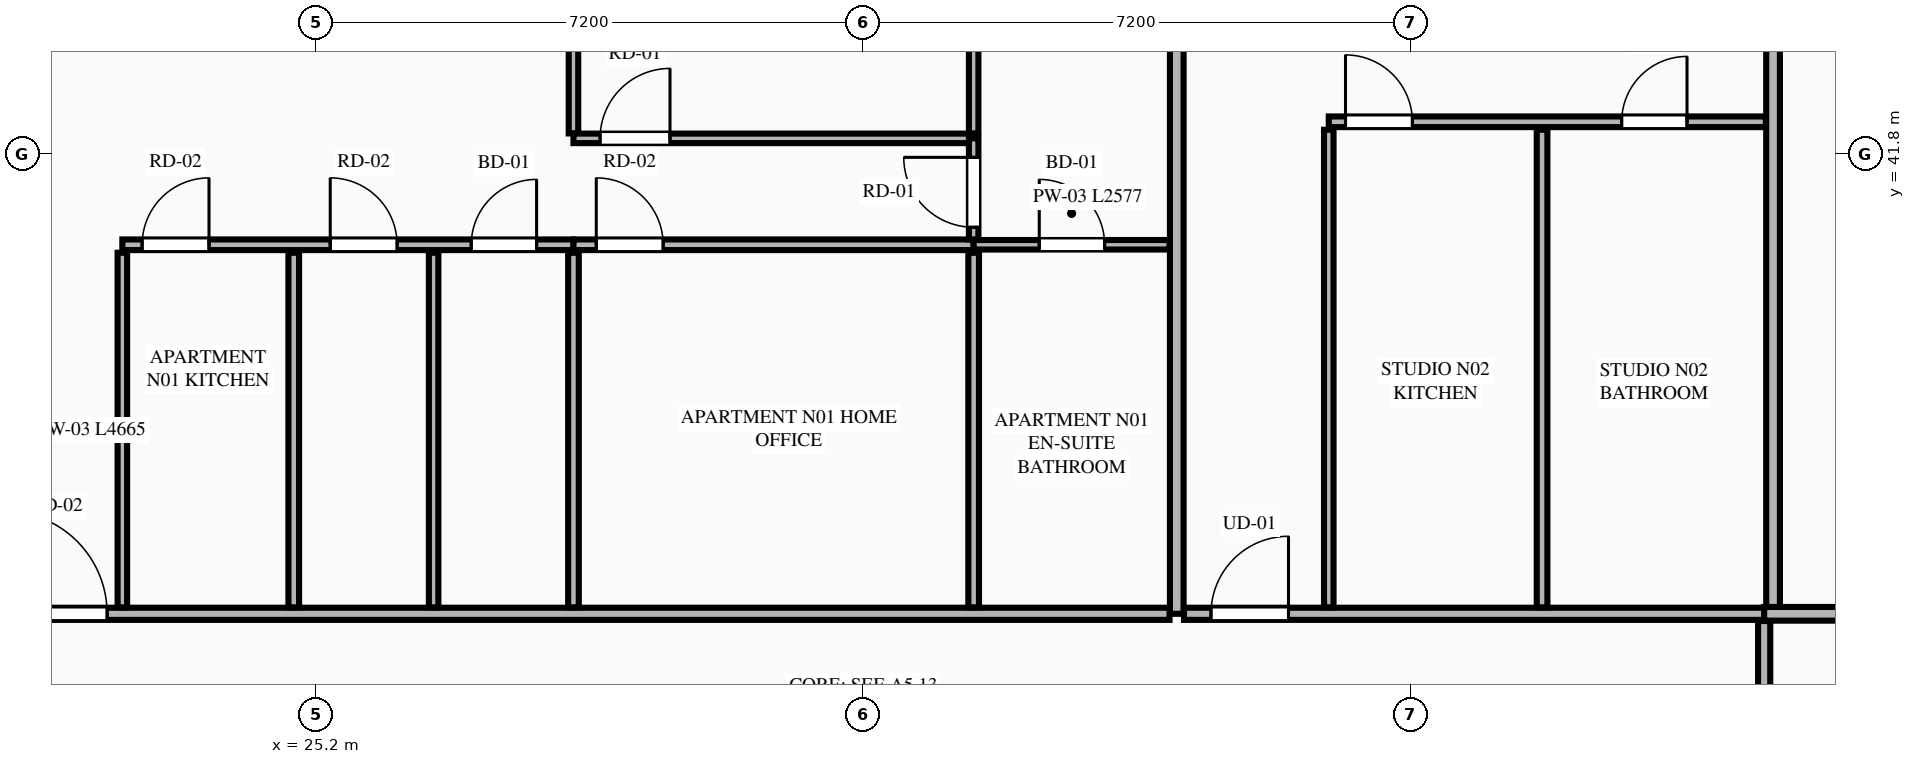
"""IFC4 building model, lengths in metres.
Left out: names, types, materials, properties, quantities, classifications, styles, units other than length and angle.
Written with IfcOpenShell. Run it as: python <this file> out.ifc"""

import sys

from ifc_helpers import new_model, si_unit, direction, frame, frame_2d, origin, place, context, subcontext, project, spatial, rectangle, extrude, element, fill, save


model = new_model("IFC4")
c1 = context("Model", 3, precision=1e-05, world=origin(), true_north=direction((0.0, 1.0)))
c2 = subcontext(c1, "Body", "Model", "MODEL_VIEW")
j1 = project(units=[si_unit("LENGTHUNIT", "METRE"), si_unit("PLANEANGLEUNIT", "RADIAN")], contexts=[c1])
p1 = place(None, origin())
s1 = spatial("IfcSite", under=j1, at=p1, CompositionType="ELEMENT")
p2 = place(p1, origin())
s2 = spatial("IfcBuilding", under=s1, at=p2, CompositionType="ELEMENT")
p3 = place(p2, frame((0.0, 0.0, 94.2)))
s3 = spatial("IfcBuildingStorey", under=s2, at=p3, CompositionType="ELEMENT", Elevation=94.2)
for number, where, z_axis, x_axis in (
    (1, (36.522, 35.75, 0.0), (0.0, 0.0, 1.0), (0.0, 1.0, 0.0)),
    (2, (44.367, 35.75, 0.0), (0.0, 0.0, 1.0), (0.0, 1.0, 0.0)),
):
    element("IfcWall", number, at=place(p3, frame(where, z_axis=z_axis, x_axis=x_axis)), inside=s3, PredefinedType="PARTITIONING", context=c2, shape_type="SweptSolid", body=[
        extrude(rectangle(XDim=13.485, YDim=0.18, at=frame_2d((6.743, 0.0))), origin(), (0.0, 0.0, 1.0), 2.59),
    ])
p4 = place(p3, frame((20.528, 35.75, 0.0), z_axis=(0.0, 0.0, 1.0), x_axis=(1.0, 0.0, 0.0)))
e3 = element("IfcWall", 3, at=p4, inside=s3, PredefinedType="PARTITIONING", context=c2, shape_type="SweptSolid", body=[
    extrude(rectangle(XDim=15.899, YDim=0.16, at=frame_2d((7.949, 0.0))), origin(), (0.0, 0.0, 1.0), 3.99),
])
p5 = place(p4, frame((0.572, 0.0, 0.0)))
e4 = element("IfcOpeningElement", 4, at=p5, cuts=e3, PredefinedType="OPENING", context=c2, shape_type="SweptSolid", body=[
    extrude(rectangle(XDim=1.35, YDim=2.35, at=frame_2d((0.675, 1.175))), frame((0.0, 0.09, 0.0), z_axis=(0.0, -1.0, 0.0), x_axis=(1.0, 0.0, 0.0)), (0.0, 0.0, 1.0), 0.18),
])
p6 = place(p3, frame((22.65, 35.835, 0.0), z_axis=(0.0, 0.0, 1.0), x_axis=(0.0, 1.0, 0.0)))
e5 = element("IfcWall", 5, at=p6, inside=s3, PredefinedType="PARTITIONING", context=c2, shape_type="SweptSolid", body=[
    extrude(rectangle(XDim=4.665, YDim=0.125, at=frame_2d((2.333, 0.0))), origin(), (0.0, 0.0, 1.0), 2.59),
])
p7 = place(p3, frame((22.65, 40.605, 0.0), z_axis=(0.0, 0.0, 1.0), x_axis=(1.0, 0.0, 0.0)))
e6 = element("IfcWall", 6, at=p7, inside=s3, PredefinedType="PLUMBINGWALL", context=c2, shape_type="SweptSolid", body=[
    extrude(rectangle(XDim=5.935, YDim=0.14, at=frame_2d((2.968, 0.0))), origin(), (0.0, 0.0, 1.0), 3.99),
])
p8 = place(p7, frame((4.59, 0.0, 0.0)))
e7 = element("IfcOpeningElement", 7, at=p8, cuts=e6, PredefinedType="OPENING", context=c2, shape_type="SweptSolid", body=[
    extrude(rectangle(XDim=0.86, YDim=2.1, at=frame_2d((0.43, 1.05))), frame((0.0, 0.08, 0.0), z_axis=(0.0, -1.0, 0.0), x_axis=(1.0, 0.0, 0.0)), (0.0, 0.0, 1.0), 0.16),
])
p9 = place(p7, frame((0.26, 0.0, 0.0)))
e8 = element("IfcOpeningElement", 8, at=p9, cuts=e6, PredefinedType="OPENING", context=c2, shape_type="SweptSolid", body=[
    extrude(rectangle(XDim=0.88, YDim=2.15, at=frame_2d((0.44, 1.075))), frame((0.0, 0.08, 0.0), z_axis=(0.0, -1.0, 0.0), x_axis=(1.0, 0.0, 0.0)), (0.0, 0.0, 1.0), 0.16),
])
p10 = place(p7, frame((2.735, 0.0, 0.0)))
e9 = element("IfcOpeningElement", 9, at=p10, cuts=e6, PredefinedType="OPENING", context=c2, shape_type="SweptSolid", body=[
    extrude(rectangle(XDim=0.88, YDim=2.15, at=frame_2d((0.44, 1.075))), frame((0.0, 0.08, 0.0), z_axis=(0.0, -1.0, 0.0), x_axis=(1.0, 0.0, 0.0)), (0.0, 0.0, 1.0), 0.16),
])
p11 = place(p3, frame((28.585, 40.605, 0.0), z_axis=(0.0, 0.0, 1.0), x_axis=(1.0, 0.0, 0.0)))
e10 = element("IfcWall", 10, at=p11, inside=s3, PredefinedType="PLUMBINGWALL", context=c2, shape_type="SweptSolid", body=[
    extrude(rectangle(XDim=5.265, YDim=0.14, at=frame_2d((2.633, 0.0))), origin(), (0.0, 0.0, 1.0), 3.99),
])
p12 = place(p11, frame((0.3, 0.0, 0.0)))
e11 = element("IfcOpeningElement", 11, at=p12, cuts=e10, PredefinedType="OPENING", context=c2, shape_type="SweptSolid", body=[
    extrude(rectangle(XDim=0.88, YDim=2.15, at=frame_2d((0.44, 1.075))), frame((0.0, 0.08, 0.0), z_axis=(0.0, -1.0, 0.0), x_axis=(1.0, 0.0, 0.0)), (0.0, 0.0, 1.0), 0.16),
])
p13 = place(p3, frame((33.85, 40.605, 0.0), z_axis=(0.0, 0.0, 1.0), x_axis=(1.0, 0.0, 0.0)))
e12 = element("IfcWall", 12, at=p13, inside=s3, PredefinedType="PARTITIONING", context=c2, shape_type="SweptSolid", body=[
    extrude(rectangle(XDim=2.577, YDim=0.125, at=frame_2d((1.289, 0.0))), origin(), (0.0, 0.0, 1.0), 3.99),
])
p14 = place(p13, frame((0.863, 0.0, 0.0)))
e13 = element("IfcOpeningElement", 13, at=p14, cuts=e12, PredefinedType="OPENING", context=c2, shape_type="SweptSolid", body=[
    extrude(rectangle(XDim=0.86, YDim=2.1, at=frame_2d((0.43, 1.05))), frame((0.0, 0.073, 0.0), z_axis=(0.0, -1.0, 0.0), x_axis=(1.0, 0.0, 0.0)), (0.0, 0.0, 1.0), 0.145),
])
p15 = place(p3, frame((24.905, 35.835, 0.0), z_axis=(0.0, 0.0, 1.0), x_axis=(0.0, 1.0, 0.0)))
e14 = element("IfcWall", 14, at=p15, inside=s3, PredefinedType="PLUMBINGWALL", context=c2, shape_type="SweptSolid", body=[
    extrude(rectangle(XDim=4.665, YDim=0.14, at=frame_2d((2.333, 0.0))), origin(), (0.0, 0.0, 1.0), 3.99),
])
p16 = place(p3, frame((26.745, 35.835, 0.0), z_axis=(0.0, 0.0, 1.0), x_axis=(0.0, 1.0, 0.0)))
e15 = element("IfcWall", 15, at=p16, inside=s3, PredefinedType="PARTITIONING", context=c2, shape_type="SweptSolid", body=[
    extrude(rectangle(XDim=4.665, YDim=0.125, at=frame_2d((2.333, 0.0))), origin(), (0.0, 0.0, 1.0), 3.99),
])
p17 = place(p3, frame((28.585, 42.07, 0.0), z_axis=(0.0, 0.0, 1.0), x_axis=(0.0, 1.0, 0.0)))
e16 = element("IfcWall", 16, at=p17, inside=s3, PredefinedType="PARTITIONING", context=c2, shape_type="SweptSolid", body=[
    extrude(rectangle(XDim=7.165, YDim=0.125, at=frame_2d((3.583, 0.0))), origin(), (0.0, 0.0, 1.0), 2.59),
])
p18 = place(p3, frame((28.585, 42.005, 0.0), z_axis=(0.0, 0.0, 1.0), x_axis=(1.0, 0.0, 0.0)))
e17 = element("IfcWall", 17, at=p18, inside=s3, PredefinedType="PARTITIONING", context=c2, shape_type="SweptSolid", body=[
    extrude(rectangle(XDim=5.265, YDim=0.125, at=frame_2d((2.633, 0.0))), origin(), (0.0, 0.0, 1.0), 3.99),
])
p19 = place(p18, frame((0.35, 0.0, 0.0)))
e18 = element("IfcOpeningElement", 18, at=p19, cuts=e17, PredefinedType="OPENING", context=c2, shape_type="SweptSolid", body=[
    extrude(rectangle(XDim=0.92, YDim=2.15, at=frame_2d((0.46, 1.075))), frame((0.0, 0.073, 0.0), z_axis=(0.0, -1.0, 0.0), x_axis=(1.0, 0.0, 0.0)), (0.0, 0.0, 1.0), 0.145),
])
p20 = place(p3, frame((33.85, 40.675, 0.0), z_axis=(0.0, 0.0, 1.0), x_axis=(0.0, 1.0, 0.0)))
e19 = element("IfcWall", 19, at=p20, inside=s3, PredefinedType="PARTITIONING", context=c2, shape_type="SweptSolid", body=[
    extrude(rectangle(XDim=1.33, YDim=0.125, at=frame_2d((0.665, 0.0))), origin(), (0.0, 0.0, 1.0), 3.99),
])
p21 = place(p20, frame((0.16, 0.0, 0.0)))
e20 = element("IfcOpeningElement", 20, at=p21, cuts=e19, PredefinedType="OPENING", context=c2, shape_type="SweptSolid", body=[
    extrude(rectangle(XDim=0.92, YDim=2.15, at=frame_2d((0.46, 1.075))), frame((0.0, 0.073, 0.0), z_axis=(0.0, -1.0, 0.0), x_axis=(1.0, 0.0, 0.0)), (0.0, 0.0, 1.0), 0.145),
])
p22 = place(p3, frame((28.585, 35.835, 0.0), z_axis=(0.0, 0.0, 1.0), x_axis=(0.0, 1.0, 0.0)))
e21 = element("IfcWall", 21, at=p22, inside=s3, PredefinedType="PLUMBINGWALL", context=c2, shape_type="SweptSolid", body=[
    extrude(rectangle(XDim=4.665, YDim=0.14, at=frame_2d((2.333, 0.0))), origin(), (0.0, 0.0, 1.0), 2.59),
])
p23 = place(p3, frame((33.85, 35.835, 0.0), z_axis=(0.0, 0.0, 1.0), x_axis=(0.0, 1.0, 0.0)))
e22 = element("IfcWall", 22, at=p23, inside=s3, PredefinedType="PLUMBINGWALL", context=c2, shape_type="SweptSolid", body=[
    extrude(rectangle(XDim=4.665, YDim=0.14, at=frame_2d((2.333, 0.0))), origin(), (0.0, 0.0, 1.0), 3.99),
])
p24 = place(p3, frame((33.85, 42.07, 0.0), z_axis=(0.0, 0.0, 1.0), x_axis=(0.0, 1.0, 0.0)))
e23 = element("IfcWall", 23, at=p24, inside=s3, PredefinedType="PARTITIONING", context=c2, shape_type="SweptSolid", body=[
    extrude(rectangle(XDim=7.165, YDim=0.125, at=frame_2d((3.583, 0.0))), origin(), (0.0, 0.0, 1.0), 3.99),
])
p25 = place(p3, frame((36.617, 35.75, 0.0), z_axis=(0.0, 0.0, 1.0), x_axis=(1.0, 0.0, 0.0)))
e24 = element("IfcWall", 24, at=p25, inside=s3, PredefinedType="PARTITIONING", context=c2, shape_type="SweptSolid", body=[
    extrude(rectangle(XDim=7.655, YDim=0.16, at=frame_2d((3.828, 0.0))), origin(), (0.0, 0.0, 1.0), 3.99),
])
p26 = place(p25, frame((0.355, 0.0, 0.0)))
e25 = element("IfcOpeningElement", 25, at=p26, cuts=e24, PredefinedType="OPENING", context=c2, shape_type="SweptSolid", body=[
    extrude(rectangle(XDim=1.02, YDim=2.25, at=frame_2d((0.51, 1.125))), frame((0.0, 0.09, 0.0), z_axis=(0.0, -1.0, 0.0), x_axis=(1.0, 0.0, 0.0)), (0.0, 0.0, 1.0), 0.18),
])
p27 = place(p3, frame((38.522, 35.835, 0.0), z_axis=(0.0, 0.0, 1.0), x_axis=(0.0, 1.0, 0.0)))
e26 = element("IfcWall", 26, at=p27, inside=s3, PredefinedType="PARTITIONING", context=c2, shape_type="SweptSolid", body=[
    extrude(rectangle(XDim=6.283, YDim=0.125, at=frame_2d((3.142, 0.0))), origin(), (0.0, 0.0, 1.0), 3.99),
])
p28 = place(p3, frame((38.522, 42.223, 0.0), z_axis=(0.0, 0.0, 1.0), x_axis=(1.0, 0.0, 0.0)))
e27 = element("IfcWall", 27, at=p28, inside=s3, PredefinedType="PLUMBINGWALL", context=c2, shape_type="SweptSolid", body=[
    extrude(rectangle(XDim=5.75, YDim=0.14, at=frame_2d((2.875, 0.0))), origin(), (0.0, 0.0, 1.0), 3.99),
])
p29 = place(p28, frame((3.853, 0.0, 0.0)))
e28 = element("IfcOpeningElement", 28, at=p29, cuts=e27, PredefinedType="OPENING", context=c2, shape_type="SweptSolid", body=[
    extrude(rectangle(XDim=0.86, YDim=2.1, at=frame_2d((0.43, 1.05))), frame((0.0, 0.08, 0.0), z_axis=(0.0, -1.0, 0.0), x_axis=(1.0, 0.0, 0.0)), (0.0, 0.0, 1.0), 0.16),
])
p30 = place(p28, frame((0.22, 0.0, 0.0)))
e29 = element("IfcOpeningElement", 29, at=p30, cuts=e27, PredefinedType="OPENING", context=c2, shape_type="SweptSolid", body=[
    extrude(rectangle(XDim=0.88, YDim=2.15, at=frame_2d((0.44, 1.075))), frame((0.0, 0.08, 0.0), z_axis=(0.0, -1.0, 0.0), x_axis=(1.0, 0.0, 0.0)), (0.0, 0.0, 1.0), 0.16),
])
p31 = place(p3, frame((41.328, 35.835, 0.0), z_axis=(0.0, 0.0, 1.0), x_axis=(0.0, 1.0, 0.0)))
e30 = element("IfcWall", 30, at=p31, inside=s3, PredefinedType="PLUMBINGWALL", context=c2, shape_type="SweptSolid", body=[
    extrude(rectangle(XDim=6.283, YDim=0.14, at=frame_2d((3.142, 0.0))), origin(), (0.0, 0.0, 1.0), 2.59),
])
p32 = place(p3, frame((44.25, 35.75, 0.0), z_axis=(0.0, 0.0, 1.0), x_axis=(1.0, 0.0, 0.0)))
e31 = element("IfcWall", 31, at=p32, inside=s3, PredefinedType="PARTITIONING", context=c2, shape_type="SweptSolid", body=[
    extrude(rectangle(XDim=9.947, YDim=0.18, at=frame_2d((4.974, 0.0))), origin(), (0.0, 0.0, 1.0), 3.99),
])
p33 = place(p3, frame((44.25, 16.295, 0.0), z_axis=(0.0, 0.0, 1.0), x_axis=(0.0, 1.0, 0.0)))
e32 = element("IfcWall", 32, at=p33, inside=s3, PredefinedType="PARTITIONING", context=c2, shape_type="SweptSolid", body=[
    extrude(rectangle(XDim=19.36, YDim=0.16, at=frame_2d((9.68, 0.0))), origin(), (0.0, 0.0, 1.0), 2.59),
])
p34 = place(p33, frame((0.45, 0.0, 0.0)))
e33 = element("IfcOpeningElement", 33, at=p34, cuts=e32, PredefinedType="OPENING", context=c2, shape_type="SweptSolid", body=[
    extrude(rectangle(XDim=1.02, YDim=2.25, at=frame_2d((0.51, 1.125))), frame((0.0, 0.09, 0.0), z_axis=(0.0, -1.0, 0.0), x_axis=(1.0, 0.0, 0.0)), (0.0, 0.0, 1.0), 0.18),
])
p35 = place(p8, origin())
e34 = element("IfcDoor", 34, at=p35, inside=s3, OperationType="SINGLE_SWING_RIGHT", PredefinedType="DOOR", context=c2, shape_type="SweptSolid", body=[
    extrude(rectangle(XDim=0.86, YDim=2.1, at=frame_2d((0.43, 1.05))), frame((0.0, 0.025, 0.0), z_axis=(0.0, -1.0, 0.0), x_axis=(1.0, 0.0, 0.0)), (0.0, 0.0, 1.0), 0.05),
])
fill(e7, e34)
p36 = place(p14, origin())
e35 = element("IfcDoor", 35, at=p36, inside=s3, OperationType="SINGLE_SWING_LEFT", PredefinedType="DOOR", context=c2, shape_type="SweptSolid", body=[
    extrude(rectangle(XDim=0.86, YDim=2.1, at=frame_2d((0.43, 1.05))), frame((0.0, 0.025, 0.0), z_axis=(0.0, -1.0, 0.0), x_axis=(1.0, 0.0, 0.0)), (0.0, 0.0, 1.0), 0.05),
])
fill(e13, e35)
p37 = place(p5, origin())
e36 = element("IfcDoor", 36, at=p37, inside=s3, OperationType="SINGLE_SWING_LEFT", PredefinedType="DOOR", context=c2, shape_type="SweptSolid", body=[
    extrude(rectangle(XDim=1.35, YDim=2.35, at=frame_2d((0.675, 1.175))), frame((0.0, 0.025, 0.0), z_axis=(0.0, -1.0, 0.0), x_axis=(1.0, 0.0, 0.0)), (0.0, 0.0, 1.0), 0.05),
])
fill(e4, e36)
p38 = place(p9, origin())
e37 = element("IfcDoor", 37, at=p38, inside=s3, OperationType="SINGLE_SWING_RIGHT", PredefinedType="DOOR", context=c2, shape_type="SweptSolid", body=[
    extrude(rectangle(XDim=0.88, YDim=2.15, at=frame_2d((0.44, 1.075))), frame((0.0, 0.025, 0.0), z_axis=(0.0, -1.0, 0.0), x_axis=(1.0, 0.0, 0.0)), (0.0, 0.0, 1.0), 0.05),
])
fill(e8, e37)
p39 = place(p10, origin())
e38 = element("IfcDoor", 38, at=p39, inside=s3, OperationType="SINGLE_SWING_LEFT", PredefinedType="DOOR", context=c2, shape_type="SweptSolid", body=[
    extrude(rectangle(XDim=0.88, YDim=2.15, at=frame_2d((0.44, 1.075))), frame((0.0, 0.025, 0.0), z_axis=(0.0, -1.0, 0.0), x_axis=(1.0, 0.0, 0.0)), (0.0, 0.0, 1.0), 0.05),
])
fill(e9, e38)
p40 = place(p12, origin())
e39 = element("IfcDoor", 39, at=p40, inside=s3, OperationType="SINGLE_SWING_LEFT", PredefinedType="DOOR", context=c2, shape_type="SweptSolid", body=[
    extrude(rectangle(XDim=0.88, YDim=2.15, at=frame_2d((0.44, 1.075))), frame((0.0, 0.025, 0.0), z_axis=(0.0, -1.0, 0.0), x_axis=(1.0, 0.0, 0.0)), (0.0, 0.0, 1.0), 0.05),
])
fill(e11, e39)
p41 = place(p19, origin())
e40 = element("IfcDoor", 40, at=p41, inside=s3, OperationType="SINGLE_SWING_RIGHT", PredefinedType="DOOR", context=c2, shape_type="SweptSolid", body=[
    extrude(rectangle(XDim=0.92, YDim=2.15, at=frame_2d((0.46, 1.075))), frame((0.0, 0.025, 0.0), z_axis=(0.0, -1.0, 0.0), x_axis=(1.0, 0.0, 0.0)), (0.0, 0.0, 1.0), 0.05),
])
fill(e18, e40)
p42 = place(p21, origin())
e41 = element("IfcDoor", 41, at=p42, inside=s3, OperationType="SINGLE_SWING_RIGHT", PredefinedType="DOOR", context=c2, shape_type="SweptSolid", body=[
    extrude(rectangle(XDim=0.92, YDim=2.15, at=frame_2d((0.46, 1.075))), frame((0.0, 0.025, 0.0), z_axis=(0.0, -1.0, 0.0), x_axis=(1.0, 0.0, 0.0)), (0.0, 0.0, 1.0), 0.05),
])
fill(e20, e41)
p43 = place(p29, origin())
e42 = element("IfcDoor", 42, at=p43, inside=s3, OperationType="SINGLE_SWING_RIGHT", PredefinedType="DOOR", context=c2, shape_type="SweptSolid", body=[
    extrude(rectangle(XDim=0.86, YDim=2.1, at=frame_2d((0.43, 1.05))), frame((0.0, 0.025, 0.0), z_axis=(0.0, -1.0, 0.0), x_axis=(1.0, 0.0, 0.0)), (0.0, 0.0, 1.0), 0.05),
])
fill(e28, e42)
p44 = place(p26, origin())
e43 = element("IfcDoor", 43, at=p44, inside=s3, OperationType="SINGLE_SWING_RIGHT", PredefinedType="DOOR", context=c2, shape_type="SweptSolid", body=[
    extrude(rectangle(XDim=1.02, YDim=2.25, at=frame_2d((0.51, 1.125))), frame((0.0, 0.025, 0.0), z_axis=(0.0, -1.0, 0.0), x_axis=(1.0, 0.0, 0.0)), (0.0, 0.0, 1.0), 0.05),
])
fill(e25, e43)
p45 = place(p30, origin())
e44 = element("IfcDoor", 44, at=p45, inside=s3, OperationType="SINGLE_SWING_LEFT", PredefinedType="DOOR", context=c2, shape_type="SweptSolid", body=[
    extrude(rectangle(XDim=0.88, YDim=2.15, at=frame_2d((0.44, 1.075))), frame((0.0, 0.025, 0.0), z_axis=(0.0, -1.0, 0.0), x_axis=(1.0, 0.0, 0.0)), (0.0, 0.0, 1.0), 0.05),
])
fill(e29, e44)
save(model, sys.argv[1])
